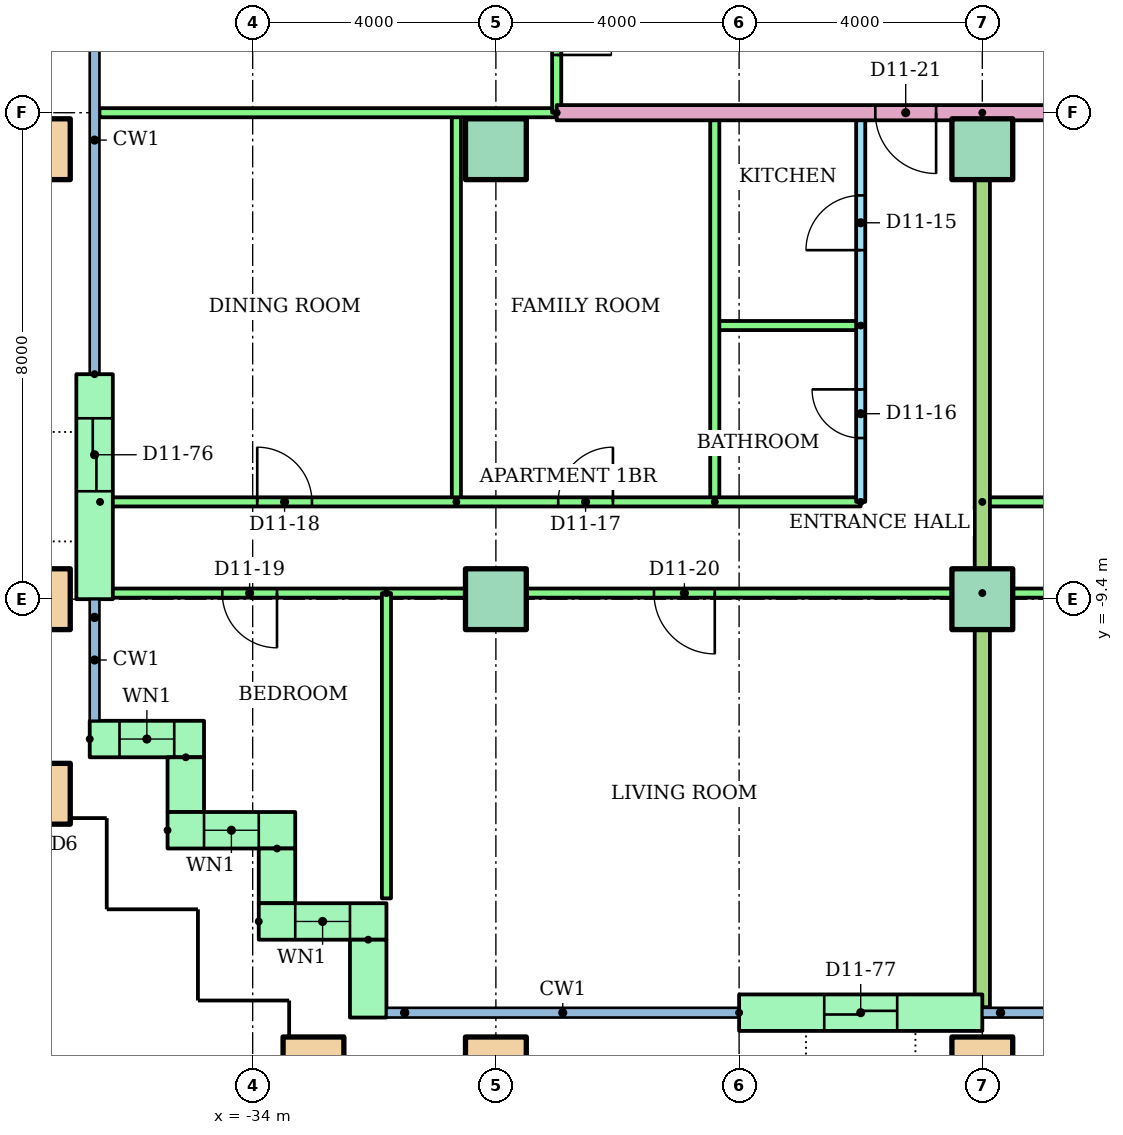
"""IFC4 building model, lengths in metres.
Left out: names, types, materials, properties, quantities, classifications, styles, units other than length and angle.
Written with IfcOpenShell. Run it as: python <this file> out.ifc"""

import sys

from ifc_helpers import new_model, si_unit, direction, frame, frame_2d, origin, origin_2d, place, context, subcontext, project, spatial, rectangle, hollow_rectangle, extrude, element, fill, save


model = new_model("IFC4")
c1 = context("Model", 3, precision=1e-05, world=origin(), true_north=direction((0.0, 1.0)))
c2 = subcontext(c1, "Body", "Model", "MODEL_VIEW")
j1 = project(units=[si_unit("LENGTHUNIT", "METRE"), si_unit("PLANEANGLEUNIT", "RADIAN")], contexts=[c1])
p1 = place(None, origin())
s1 = spatial("IfcSite", under=j1, at=p1, CompositionType="ELEMENT")
p2 = place(p1, origin())
s2 = spatial("IfcBuilding", under=s1, at=p2, CompositionType="ELEMENT")
p3 = place(p2, frame((0.0, 0.0, 44.8)))
s3 = spatial("IfcBuildingStorey", under=s2, at=p3, CompositionType="ELEMENT", Elevation=44.8)
for number, where in (
    (1, (-33.0, -17.1, 0.0)),
    (2, (-30.0, -17.1, 0.0)),
    (3, (-22.0, -17.1, 0.0)),
    (4, (-37.5, -12.6, 0.0)),
    (5, (-37.5, -9.4, 0.0)),
):
    element("IfcColumn", number, at=place(p3, frame(where)), inside=s3, PredefinedType="COLUMN", context=c2, shape_type="SweptSolid", body=[
        extrude(hollow_rectangle(XDim=1.0, YDim=1.0, WallThickness=0.05, at=origin_2d()), origin(), (0.0, 0.0, 1.0), 3.2),
    ])
for number, where in (
    (6, (-30.0, -9.4, 0.0)),
    (7, (-22.0, -9.4, 0.0)),
):
    element("IfcColumn", number, at=place(p3, frame(where)), inside=s3, PredefinedType="COLUMN", context=c2, shape_type="SweptSolid", body=[
        extrude(rectangle(XDim=1.0, YDim=1.0, at=origin_2d()), origin(), (0.0, 0.0, 1.0), 3.2),
    ])
p4 = place(p3, frame((-37.5, -2.0, 0.0)))
e8 = element("IfcColumn", 8, at=p4, inside=s3, PredefinedType="COLUMN", context=c2, shape_type="SweptSolid", body=[
    extrude(hollow_rectangle(XDim=1.0, YDim=1.0, WallThickness=0.05, at=origin_2d()), origin(), (0.0, 0.0, 1.0), 3.2),
])
for number, where in (
    (9, (-30.0, -2.0, 0.0)),
    (10, (-22.0, -2.0, 0.0)),
):
    element("IfcColumn", number, at=place(p3, frame(where)), inside=s3, PredefinedType="COLUMN", context=c2, shape_type="SweptSolid", body=[
        extrude(rectangle(XDim=1.0, YDim=1.0, at=origin_2d()), origin(), (0.0, 0.0, 1.0), 3.2),
    ])
p5 = place(p3, frame((-36.6, -5.7, 0.0), z_axis=(0.0, 0.0, 1.0), x_axis=(0.0, -1.0, 0.0)))
e11 = element("IfcWall", 11, at=p5, inside=s3, PredefinedType="STANDARD", context=c2, shape_type="SweptSolid", body=[
    extrude(rectangle(XDim=3.7, YDim=0.6, at=frame_2d((1.85, 0.0))), origin(), (0.0, 0.0, 1.0), 2.92),
])
p6 = place(p5, frame((0.725, 0.0, 0.0)))
e12 = element("IfcOpeningElement", 12, at=p6, cuts=e11, PredefinedType="OPENING", context=c2, shape_type="SweptSolid", body=[
    extrude(rectangle(XDim=1.2, YDim=2.1, at=frame_2d((0.6, 1.05))), frame((0.0, 0.31, 0.0), z_axis=(0.0, -1.0, 0.0), x_axis=(1.0, 0.0, 0.0)), (0.0, 0.0, 1.0), 0.62),
])
p7 = place(p3, frame((-36.68, -11.7, 0.0)))
e13 = element("IfcWall", 13, at=p7, inside=s3, PredefinedType="STANDARD", context=c2, shape_type="SweptSolid", body=[
    extrude(rectangle(XDim=1.88, YDim=0.6, at=frame_2d((0.94, 0.0))), origin(), (0.0, 0.0, 1.0), 2.92),
])
p8 = place(p7, frame((0.49, 0.0, 0.9)))
e14 = element("IfcOpeningElement", 14, at=p8, cuts=e13, PredefinedType="OPENING", context=c2, shape_type="SweptSolid", body=[
    extrude(rectangle(XDim=0.9, YDim=1.5, at=frame_2d((0.45, 0.75))), frame((0.0, 0.31, 0.0), z_axis=(0.0, -1.0, 0.0), x_axis=(1.0, 0.0, 0.0)), (0.0, 0.0, 1.0), 0.62),
])
p9 = place(p3, frame((-35.1, -12.0, 0.0), z_axis=(0.0, 0.0, 1.0), x_axis=(0.0, -1.0, 0.0)))
e15 = element("IfcWall", 15, at=p9, inside=s3, PredefinedType="STANDARD", context=c2, shape_type="SweptSolid", body=[
    extrude(rectangle(XDim=0.9, YDim=0.6, at=frame_2d((0.45, 0.0))), origin(), (0.0, 0.0, 1.0), 2.92),
])
p10 = place(p3, frame((-35.4, -13.2, 0.0)))
e16 = element("IfcWall", 16, at=p10, inside=s3, PredefinedType="STANDARD", context=c2, shape_type="SweptSolid", body=[
    extrude(rectangle(XDim=2.1, YDim=0.6, at=frame_2d((1.05, 0.0))), origin(), (0.0, 0.0, 1.0), 2.92),
])
p11 = place(p10, frame((0.6, 0.0, 0.9)))
e17 = element("IfcOpeningElement", 17, at=p11, cuts=e16, PredefinedType="OPENING", context=c2, shape_type="SweptSolid", body=[
    extrude(rectangle(XDim=0.9, YDim=1.5, at=frame_2d((0.45, 0.75))), frame((0.0, 0.31, 0.0), z_axis=(0.0, -1.0, 0.0), x_axis=(1.0, 0.0, 0.0)), (0.0, 0.0, 1.0), 0.62),
])
p12 = place(p3, frame((-33.6, -13.5, 0.0), z_axis=(0.0, 0.0, 1.0), x_axis=(0.0, -1.0, 0.0)))
e18 = element("IfcWall", 18, at=p12, inside=s3, PredefinedType="STANDARD", context=c2, shape_type="SweptSolid", body=[
    extrude(rectangle(XDim=0.9, YDim=0.6, at=frame_2d((0.45, 0.0))), origin(), (0.0, 0.0, 1.0), 2.92),
])
p13 = place(p3, frame((-33.9, -14.7, 0.0)))
e19 = element("IfcWall", 19, at=p13, inside=s3, PredefinedType="STANDARD", context=c2, shape_type="SweptSolid", body=[
    extrude(rectangle(XDim=2.1, YDim=0.6, at=frame_2d((1.05, 0.0))), origin(), (0.0, 0.0, 1.0), 2.92),
])
p14 = place(p13, frame((0.6, 0.0, 0.9)))
e20 = element("IfcOpeningElement", 20, at=p14, cuts=e19, PredefinedType="OPENING", context=c2, shape_type="SweptSolid", body=[
    extrude(rectangle(XDim=0.9, YDim=1.5, at=frame_2d((0.45, 0.75))), frame((0.0, 0.31, 0.0), z_axis=(0.0, -1.0, 0.0), x_axis=(1.0, 0.0, 0.0)), (0.0, 0.0, 1.0), 0.62),
])
p15 = place(p3, frame((-32.1, -15.0, 0.0), z_axis=(0.0, 0.0, 1.0), x_axis=(0.0, -1.0, 0.0)))
e21 = element("IfcWall", 21, at=p15, inside=s3, PredefinedType="STANDARD", context=c2, shape_type="SweptSolid", body=[
    extrude(rectangle(XDim=1.28, YDim=0.6, at=frame_2d((0.64, 0.0))), origin(), (0.0, 0.0, 1.0), 2.92),
])
p16 = place(p3, frame((-26.0, -16.2, 0.0)))
e22 = element("IfcWall", 22, at=p16, inside=s3, PredefinedType="STANDARD", context=c2, shape_type="SweptSolid", body=[
    extrude(rectangle(XDim=4.0, YDim=0.6, at=frame_2d((2.0, 0.0))), origin(), (0.0, 0.0, 1.0), 2.92),
])
p17 = place(p16, frame((1.4, 0.0, 0.0)))
e23 = element("IfcOpeningElement", 23, at=p17, cuts=e22, PredefinedType="OPENING", context=c2, shape_type="SweptSolid", body=[
    extrude(rectangle(XDim=1.2, YDim=2.1, at=frame_2d((0.6, 1.05))), frame((0.0, 0.31, 0.0), z_axis=(0.0, -1.0, 0.0), x_axis=(1.0, 0.0, 0.0)), (0.0, 0.0, 1.0), 0.62),
])
p18 = place(p3, frame((-24.0, -7.8, 0.0), z_axis=(0.0, 0.0, 1.0), x_axis=(0.0, 1.0, 0.0)))
e24 = element("IfcWall", 24, at=p18, inside=s3, PredefinedType="PARTITIONING", context=c2, shape_type="SweptSolid", body=[
    extrude(rectangle(XDim=6.4, YDim=0.15, at=frame_2d((3.2, 0.0))), origin(), (0.0, 0.0, 1.0), 2.4),
])
p19 = place(p18, frame((4.14, 0.0, 0.0)))
e25 = element("IfcOpeningElement", 25, at=p19, cuts=e24, PredefinedType="OPENING", context=c2, shape_type="SweptSolid", body=[
    extrude(rectangle(XDim=0.9, YDim=2.1, at=frame_2d((0.45, 1.05))), frame((0.0, 0.085, 0.0), z_axis=(0.0, -1.0, 0.0), x_axis=(1.0, 0.0, 0.0)), (0.0, 0.0, 1.0), 0.17),
])
p20 = place(p18, frame((1.05, 0.0, 0.0)))
e26 = element("IfcOpeningElement", 26, at=p20, cuts=e24, PredefinedType="OPENING", context=c2, shape_type="SweptSolid", body=[
    extrude(rectangle(XDim=0.8, YDim=2.1, at=frame_2d((0.4, 1.05))), frame((0.0, 0.085, 0.0), z_axis=(0.0, -1.0, 0.0), x_axis=(1.0, 0.0, 0.0)), (0.0, 0.0, 1.0), 0.17),
])
p21 = place(p3, frame((-24.0, -4.9, 0.0), z_axis=(0.0, 0.0, 1.0), x_axis=(-1.0, 0.0, 0.0)))
e27 = element("IfcWall", 27, at=p21, inside=s3, PredefinedType="PARTITIONING", context=c2, shape_type="SweptSolid", body=[
    extrude(rectangle(XDim=2.4, YDim=0.15, at=frame_2d((1.2, 0.0))), origin(), (0.0, 0.0, 1.0), 2.4),
])
for number, where, z_axis, x_axis in (
    (28, (-26.4, -7.8, 0.0), (0.0, 0.0, 1.0), (0.0, 1.0, 0.0)),
    (29, (-30.65, -7.8, 0.0), (0.0, 0.0, 1.0), (0.0, 1.0, 0.0)),
):
    element("IfcWall", number, at=place(p3, frame(where, z_axis=z_axis, x_axis=x_axis)), inside=s3, PredefinedType="PARTITIONING", context=c2, shape_type="SweptSolid", body=[
        extrude(rectangle(XDim=6.4, YDim=0.15, at=frame_2d((3.2, 0.0))), origin(), (0.0, 0.0, 1.0), 2.4),
    ])
p22 = place(p3, frame((-36.51, -7.8, 0.0)))
e30 = element("IfcWall", 30, at=p22, inside=s3, PredefinedType="PARTITIONING", context=c2, shape_type="SweptSolid", body=[
    extrude(rectangle(XDim=12.51, YDim=0.15, at=frame_2d((6.255, 0.0))), origin(), (0.0, 0.0, 1.0), 2.4),
])
p23 = place(p22, frame((7.535, 0.0, 0.0)))
e31 = element("IfcOpeningElement", 31, at=p23, cuts=e30, PredefinedType="OPENING", context=c2, shape_type="SweptSolid", body=[
    extrude(rectangle(XDim=0.9, YDim=2.1, at=frame_2d((0.45, 1.05))), frame((0.0, 0.085, 0.0), z_axis=(0.0, -1.0, 0.0), x_axis=(1.0, 0.0, 0.0)), (0.0, 0.0, 1.0), 0.17),
])
p24 = place(p22, frame((2.585, 0.0, 0.0)))
e32 = element("IfcOpeningElement", 32, at=p24, cuts=e30, PredefinedType="OPENING", context=c2, shape_type="SweptSolid", body=[
    extrude(rectangle(XDim=0.9, YDim=2.1, at=frame_2d((0.45, 1.05))), frame((0.0, 0.085, 0.0), z_axis=(0.0, -1.0, 0.0), x_axis=(1.0, 0.0, 0.0)), (0.0, 0.0, 1.0), 0.17),
])
p25 = place(p3, frame((-22.0, -9.3, 0.0), z_axis=(0.0, 0.0, 1.0), x_axis=(-1.0, 0.0, 0.0)))
e33 = element("IfcWall", 33, at=p25, inside=s3, PredefinedType="PARTITIONING", context=c2, shape_type="SweptSolid", body=[
    extrude(rectangle(XDim=14.51, YDim=0.15, at=frame_2d((7.255, 0.0))), origin(), (0.0, 0.0, 1.0), 2.4),
])
p26 = place(p25, frame((11.6, 0.0, 0.0)))
e34 = element("IfcOpeningElement", 34, at=p26, cuts=e33, PredefinedType="OPENING", context=c2, shape_type="SweptSolid", body=[
    extrude(rectangle(XDim=0.9, YDim=2.1, at=frame_2d((0.45, 1.05))), frame((0.0, 0.085, 0.0), z_axis=(0.0, -1.0, 0.0), x_axis=(1.0, 0.0, 0.0)), (0.0, 0.0, 1.0), 0.17),
])
p27 = place(p25, frame((4.4, 0.0, 0.0)))
e35 = element("IfcOpeningElement", 35, at=p27, cuts=e33, PredefinedType="OPENING", context=c2, shape_type="SweptSolid", body=[
    extrude(rectangle(XDim=1.0, YDim=2.1, at=frame_2d((0.5, 1.05))), frame((0.0, 0.085, 0.0), z_axis=(0.0, -1.0, 0.0), x_axis=(1.0, 0.0, 0.0)), (0.0, 0.0, 1.0), 0.17),
])
p28 = place(p3, frame((-31.8, -9.3, 0.0), z_axis=(0.0, 0.0, 1.0), x_axis=(0.0, -1.0, 0.0)))
e36 = element("IfcWall", 36, at=p28, inside=s3, PredefinedType="PARTITIONING", context=c2, shape_type="SweptSolid", body=[
    extrude(rectangle(XDim=5.02, YDim=0.15, at=frame_2d((2.51, 0.0))), origin(), (0.0, 0.0, 1.0), 2.4),
])
p29 = place(p3, frame((-22.0, -7.8, 0.0)))
e37 = element("IfcWall", 37, at=p29, inside=s3, PredefinedType="PARTITIONING", context=c2, shape_type="SweptSolid", body=[
    extrude(rectangle(XDim=22.0, YDim=0.15, at=frame_2d((11.0, 0.0))), origin(), (0.0, 0.0, 1.0), 2.4),
])
p30 = place(p29, frame((14.34, 0.0, 0.0)))
e38 = element("IfcOpeningElement", 38, at=p30, cuts=e37, PredefinedType="OPENING", context=c2, shape_type="SweptSolid", body=[
    extrude(rectangle(XDim=0.9, YDim=2.1, at=frame_2d((0.45, 1.05))), frame((0.0, 0.085, 0.0), z_axis=(0.0, -1.0, 0.0), x_axis=(1.0, 0.0, 0.0)), (0.0, 0.0, 1.0), 0.17),
])
p31 = place(p29, frame((8.76, 0.0, 0.0)))
e39 = element("IfcOpeningElement", 39, at=p31, cuts=e37, PredefinedType="OPENING", context=c2, shape_type="SweptSolid", body=[
    extrude(rectangle(XDim=0.9, YDim=2.1, at=frame_2d((0.45, 1.05))), frame((0.0, 0.085, 0.0), z_axis=(0.0, -1.0, 0.0), x_axis=(1.0, 0.0, 0.0)), (0.0, 0.0, 1.0), 0.17),
])
p32 = place(p29, frame((1.975, 0.0, 0.0)))
e40 = element("IfcOpeningElement", 40, at=p32, cuts=e37, PredefinedType="OPENING", context=c2, shape_type="SweptSolid", body=[
    extrude(rectangle(XDim=0.9, YDim=2.1, at=frame_2d((0.45, 1.05))), frame((0.0, 0.085, 0.0), z_axis=(0.0, -1.0, 0.0), x_axis=(1.0, 0.0, 0.0)), (0.0, 0.0, 1.0), 0.17),
])
p33 = place(p3, frame((2.0, -9.3, 0.0), z_axis=(0.0, 0.0, 1.0), x_axis=(-1.0, 0.0, 0.0)))
e41 = element("IfcWall", 41, at=p33, inside=s3, PredefinedType="PARTITIONING", context=c2, shape_type="SweptSolid", body=[
    extrude(rectangle(XDim=24.0, YDim=0.15, at=frame_2d((12.0, 0.0))), origin(), (0.0, 0.0, 1.0), 2.4),
])
p34 = place(p33, frame((19.5, 0.0, 0.0)))
e42 = element("IfcOpeningElement", 42, at=p34, cuts=e41, PredefinedType="OPENING", context=c2, shape_type="SweptSolid", body=[
    extrude(rectangle(XDim=1.0, YDim=2.1, at=frame_2d((0.5, 1.05))), frame((0.0, 0.085, 0.0), z_axis=(0.0, -1.0, 0.0), x_axis=(1.0, 0.0, 0.0)), (0.0, 0.0, 1.0), 0.17),
])
p35 = place(p33, frame((13.55, 0.0, 0.0)))
e43 = element("IfcOpeningElement", 43, at=p35, cuts=e41, PredefinedType="OPENING", context=c2, shape_type="SweptSolid", body=[
    extrude(rectangle(XDim=0.9, YDim=2.1, at=frame_2d((0.45, 1.05))), frame((0.0, 0.085, 0.0), z_axis=(0.0, -1.0, 0.0), x_axis=(1.0, 0.0, 0.0)), (0.0, 0.0, 1.0), 0.17),
])
p36 = place(p33, frame((9.55, 0.0, 0.0)))
e44 = element("IfcOpeningElement", 44, at=p36, cuts=e41, PredefinedType="OPENING", context=c2, shape_type="SweptSolid", body=[
    extrude(rectangle(XDim=0.9, YDim=2.1, at=frame_2d((0.45, 1.05))), frame((0.0, 0.085, 0.0), z_axis=(0.0, -1.0, 0.0), x_axis=(1.0, 0.0, 0.0)), (0.0, 0.0, 1.0), 0.17),
])
p37 = place(p33, frame((5.55, 0.0, 0.0)))
e45 = element("IfcOpeningElement", 45, at=p37, cuts=e41, PredefinedType="OPENING", context=c2, shape_type="SweptSolid", body=[
    extrude(rectangle(XDim=0.9, YDim=2.1, at=frame_2d((0.45, 1.05))), frame((0.0, 0.085, 0.0), z_axis=(0.0, -1.0, 0.0), x_axis=(1.0, 0.0, 0.0)), (0.0, 0.0, 1.0), 0.17),
])
p38 = place(p33, frame((1.55, 0.0, 0.0)))
e46 = element("IfcOpeningElement", 46, at=p38, cuts=e41, PredefinedType="OPENING", context=c2, shape_type="SweptSolid", body=[
    extrude(rectangle(XDim=0.9, YDim=2.1, at=frame_2d((0.45, 1.05))), frame((0.0, 0.085, 0.0), z_axis=(0.0, -1.0, 0.0), x_axis=(1.0, 0.0, 0.0)), (0.0, 0.0, 1.0), 0.17),
])
p39 = place(p3, frame((-22.0, -1.4, 0.0), z_axis=(0.0, 0.0, 1.0), x_axis=(0.0, -1.0, 0.0)))
e47 = element("IfcWall", 47, at=p39, inside=s3, PredefinedType="PARTITIONING", context=c2, shape_type="SweptSolid", body=[
    extrude(rectangle(XDim=14.71, YDim=0.25, at=frame_2d((7.355, 0.0))), origin(), (0.0, 0.0, 1.0), 2.4),
])
p40 = place(p3, frame((-14.0, -1.4, 0.0), z_axis=(0.0, 0.0, 1.0), x_axis=(-1.0, 0.0, 0.0)))
e48 = element("IfcWall", 48, at=p40, inside=s3, PredefinedType="PARTITIONING", context=c2, shape_type="SweptSolid", body=[
    extrude(rectangle(XDim=15.0, YDim=0.25, at=frame_2d((7.5, 0.0))), origin(), (0.0, 0.0, 1.0), 2.4),
])
p41 = place(p40, frame((8.76, 0.0, 0.0)))
e49 = element("IfcOpeningElement", 49, at=p41, cuts=e48, PredefinedType="OPENING", context=c2, shape_type="SweptSolid", body=[
    extrude(rectangle(XDim=1.0, YDim=2.1, at=frame_2d((0.5, 1.05))), frame((0.0, 0.135, 0.0), z_axis=(0.0, -1.0, 0.0), x_axis=(1.0, 0.0, 0.0)), (0.0, 0.0, 1.0), 0.27),
])
p42 = place(p3, frame((-29.0, -1.4, 0.0), z_axis=(0.0, 0.0, 1.0), x_axis=(-1.0, 0.0, 0.0)))
e50 = element("IfcWall", 50, at=p42, inside=s3, PredefinedType="PARTITIONING", context=c2, shape_type="SweptSolid", body=[
    extrude(rectangle(XDim=7.52, YDim=0.15, at=frame_2d((3.76, 0.0))), origin(), (0.0, 0.0, 1.0), 2.4),
])
p43 = place(p3, frame((-29.0, 1.4, 0.0), z_axis=(0.0, 0.0, 1.0), x_axis=(0.0, -1.0, 0.0)))
e51 = element("IfcWall", 51, at=p43, inside=s3, PredefinedType="PARTITIONING", context=c2, shape_type="SweptSolid", body=[
    extrude(rectangle(XDim=2.8, YDim=0.15, at=frame_2d((1.4, 0.0))), origin(), (0.0, 0.0, 1.0), 2.4),
])
p44 = place(p43, frame((0.95, 0.0, 0.0)))
e52 = element("IfcOpeningElement", 52, at=p44, cuts=e51, PredefinedType="OPENING", context=c2, shape_type="SweptSolid", body=[
    extrude(rectangle(XDim=0.9, YDim=2.1, at=frame_2d((0.45, 1.05))), frame((0.0, 0.085, 0.0), z_axis=(0.0, -1.0, 0.0), x_axis=(1.0, 0.0, 0.0)), (0.0, 0.0, 1.0), 0.17),
])
p45 = place(p8, origin())
e53 = element("IfcWindow", 53, at=p45, inside=s3, PartitioningType="SINGLE_PANEL", PredefinedType="WINDOW", context=c2, shape_type="SweptSolid", body=[
    extrude(rectangle(XDim=0.9, YDim=1.5, at=frame_2d((0.45, 0.75))), frame((0.0, 0.03, 0.0), z_axis=(0.0, -1.0, 0.0), x_axis=(1.0, 0.0, 0.0)), (0.0, 0.0, 1.0), 0.06),
])
fill(e14, e53)
p46 = place(p11, origin())
e54 = element("IfcWindow", 54, at=p46, inside=s3, PartitioningType="SINGLE_PANEL", PredefinedType="WINDOW", context=c2, shape_type="SweptSolid", body=[
    extrude(rectangle(XDim=0.9, YDim=1.5, at=frame_2d((0.45, 0.75))), frame((0.0, 0.03, 0.0), z_axis=(0.0, -1.0, 0.0), x_axis=(1.0, 0.0, 0.0)), (0.0, 0.0, 1.0), 0.06),
])
fill(e17, e54)
p47 = place(p14, origin())
e55 = element("IfcWindow", 55, at=p47, inside=s3, PartitioningType="SINGLE_PANEL", PredefinedType="WINDOW", context=c2, shape_type="SweptSolid", body=[
    extrude(rectangle(XDim=0.9, YDim=1.5, at=frame_2d((0.45, 0.75))), frame((0.0, 0.03, 0.0), z_axis=(0.0, -1.0, 0.0), x_axis=(1.0, 0.0, 0.0)), (0.0, 0.0, 1.0), 0.06),
])
fill(e20, e55)
p48 = place(p19, origin())
e56 = element("IfcDoor", 56, at=p48, inside=s3, OperationType="SINGLE_SWING_LEFT", PredefinedType="DOOR", context=c2, shape_type="SweptSolid", body=[
    extrude(rectangle(XDim=0.9, YDim=2.1, at=frame_2d((0.45, 1.05))), frame((0.0, 0.025, 0.0), z_axis=(0.0, -1.0, 0.0), x_axis=(1.0, 0.0, 0.0)), (0.0, 0.0, 1.0), 0.05),
])
fill(e25, e56)
p49 = place(p20, origin())
e57 = element("IfcDoor", 57, at=p49, inside=s3, OperationType="SINGLE_SWING_RIGHT", PredefinedType="DOOR", context=c2, shape_type="SweptSolid", body=[
    extrude(rectangle(XDim=0.8, YDim=2.1, at=frame_2d((0.4, 1.05))), frame((0.0, 0.025, 0.0), z_axis=(0.0, -1.0, 0.0), x_axis=(1.0, 0.0, 0.0)), (0.0, 0.0, 1.0), 0.05),
])
fill(e26, e57)
p50 = place(p23, origin())
e58 = element("IfcDoor", 58, at=p50, inside=s3, OperationType="SINGLE_SWING_RIGHT", PredefinedType="DOOR", context=c2, shape_type="SweptSolid", body=[
    extrude(rectangle(XDim=0.9, YDim=2.1, at=frame_2d((0.45, 1.05))), frame((0.0, 0.025, 0.0), z_axis=(0.0, -1.0, 0.0), x_axis=(1.0, 0.0, 0.0)), (0.0, 0.0, 1.0), 0.05),
])
fill(e31, e58)
p51 = place(p24, origin())
e59 = element("IfcDoor", 59, at=p51, inside=s3, OperationType="SINGLE_SWING_LEFT", PredefinedType="DOOR", context=c2, shape_type="SweptSolid", body=[
    extrude(rectangle(XDim=0.9, YDim=2.1, at=frame_2d((0.45, 1.05))), frame((0.0, 0.025, 0.0), z_axis=(0.0, -1.0, 0.0), x_axis=(1.0, 0.0, 0.0)), (0.0, 0.0, 1.0), 0.05),
])
fill(e32, e59)
p52 = place(p26, origin())
e60 = element("IfcDoor", 60, at=p52, inside=s3, OperationType="SINGLE_SWING_LEFT", PredefinedType="DOOR", context=c2, shape_type="SweptSolid", body=[
    extrude(rectangle(XDim=0.9, YDim=2.1, at=frame_2d((0.45, 1.05))), frame((0.0, 0.025, 0.0), z_axis=(0.0, -1.0, 0.0), x_axis=(1.0, 0.0, 0.0)), (0.0, 0.0, 1.0), 0.05),
])
fill(e34, e60)
p53 = place(p27, origin())
e61 = element("IfcDoor", 61, at=p53, inside=s3, OperationType="SINGLE_SWING_LEFT", PredefinedType="DOOR", context=c2, shape_type="SweptSolid", body=[
    extrude(rectangle(XDim=1.0, YDim=2.1, at=frame_2d((0.5, 1.05))), frame((0.0, 0.025, 0.0), z_axis=(0.0, -1.0, 0.0), x_axis=(1.0, 0.0, 0.0)), (0.0, 0.0, 1.0), 0.05),
])
fill(e35, e61)
p54 = place(p41, origin())
e62 = element("IfcDoor", 62, at=p54, inside=s3, OperationType="SINGLE_SWING_LEFT", PredefinedType="DOOR", context=c2, shape_type="SweptSolid", body=[
    extrude(rectangle(XDim=1.0, YDim=2.1, at=frame_2d((0.5, 1.05))), frame((0.0, 0.025, 0.0), z_axis=(0.0, -1.0, 0.0), x_axis=(1.0, 0.0, 0.0)), (0.0, 0.0, 1.0), 0.05),
])
fill(e49, e62)
p55 = place(p44, origin())
e63 = element("IfcDoor", 63, at=p55, inside=s3, OperationType="SINGLE_SWING_RIGHT", PredefinedType="DOOR", context=c2, shape_type="SweptSolid", body=[
    extrude(rectangle(XDim=0.9, YDim=2.1, at=frame_2d((0.45, 1.05))), frame((0.0, 0.025, 0.0), z_axis=(0.0, -1.0, 0.0), x_axis=(1.0, 0.0, 0.0)), (0.0, 0.0, 1.0), 0.05),
])
fill(e52, e63)
p56 = place(p6, origin())
e64 = element("IfcDoor", 64, at=p56, inside=s3, OperationType="SLIDING_TO_LEFT", PredefinedType="DOOR", context=c2, shape_type="SweptSolid", body=[
    extrude(rectangle(XDim=1.2, YDim=2.1, at=frame_2d((0.6, 1.05))), frame((0.0, 0.025, 0.0), z_axis=(0.0, -1.0, 0.0), x_axis=(1.0, 0.0, 0.0)), (0.0, 0.0, 1.0), 0.05),
])
fill(e12, e64)
p57 = place(p17, origin())
e65 = element("IfcDoor", 65, at=p57, inside=s3, OperationType="SLIDING_TO_LEFT", PredefinedType="DOOR", context=c2, shape_type="SweptSolid", body=[
    extrude(rectangle(XDim=1.2, YDim=2.1, at=frame_2d((0.6, 1.05))), frame((0.0, 0.025, 0.0), z_axis=(0.0, -1.0, 0.0), x_axis=(1.0, 0.0, 0.0)), (0.0, 0.0, 1.0), 0.05),
])
fill(e23, e65)
save(model, sys.argv[1])
